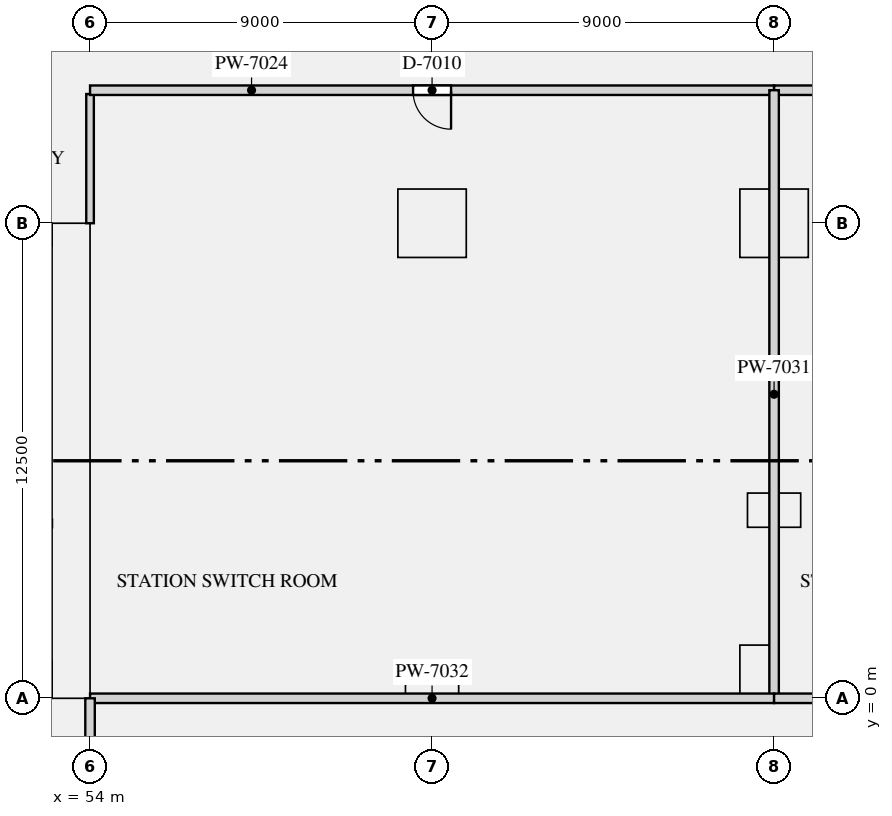
"""IFC4 building model, lengths in metres.
Left out: names, types, materials, properties, quantities, classifications, styles, units other than length and angle.
Written with IfcOpenShell. Run it as: python <this file> out.ifc"""

import sys

from ifc_helpers import new_model, si_unit, direction, frame, frame_2d, origin, origin_2d, place, context, subcontext, project, spatial, rectangle, extrude, element, fill, save


model = new_model("IFC4")
c1 = context("Model", 3, precision=1e-05, world=origin(), true_north=direction((0.0, 1.0)))
c2 = subcontext(c1, "Body", "Model", "MODEL_VIEW")
j1 = project(units=[si_unit("LENGTHUNIT", "METRE"), si_unit("PLANEANGLEUNIT", "RADIAN")], contexts=[c1])
p1 = place(None, origin())
s1 = spatial("IfcSite", under=j1, at=p1, CompositionType="ELEMENT")
p2 = place(p1, origin())
s2 = spatial("IfcBuilding", under=s1, at=p2, CompositionType="ELEMENT")
p3 = place(p2, frame((0.0, 0.0, -6.0)))
s3 = spatial("IfcBuildingStorey", under=s2, at=p3, CompositionType="ELEMENT", Elevation=-6.0)
for number, where, z_axis, x_axis in (
    (1, (63.0, 0.45, -0.5), (0.0, 0.0, 1.0), (1.0, 0.0, 0.0)),
    (2, (71.55, 0.7, -0.5), (0.0, 0.0, 1.0), (0.0, 1.0, 0.0)),
    (3, (72.0, 4.95, -0.5), (0.0, 0.0, 1.0), (1.0, 0.0, 0.0)),
):
    element("IfcColumn", number, at=place(p3, frame(where, z_axis=z_axis, x_axis=x_axis)), inside=s3, PredefinedType="USERDEFINED", context=c2, shape_type="SweptSolid", body=[
        extrude(rectangle(XDim=1.4, YDim=0.9, at=origin_2d()), origin(), (0.0, 0.0, 1.0), 6.5),
    ])
for number, where, z_axis, x_axis in (
    (4, (63.0, 12.5, -0.5), (0.0, 0.0, 1.0), (1.0, 0.0, 0.0)),
    (5, (72.0, 12.5, -0.5), (0.0, 0.0, 1.0), (1.0, 0.0, 0.0)),
):
    element("IfcColumn", number, at=place(p3, frame(where, z_axis=z_axis, x_axis=x_axis)), inside=s3, PredefinedType="COLUMN", context=c2, shape_type="SweptSolid", body=[
        extrude(rectangle(XDim=1.8, YDim=1.8, at=origin_2d()), origin(), (0.0, 0.0, 1.0), 6.5),
    ])
p4 = place(p3, frame((53.5, 0.0, -0.5), z_axis=(0.0, 0.0, 1.0), x_axis=(0.0, 1.0, 0.0)))
e6 = element("IfcWall", 6, at=p4, inside=s3, PredefinedType="SHEAR", context=c2, shape_type="SweptSolid", body=[
    extrude(rectangle(XDim=12.5, YDim=1.0, at=frame_2d((6.25, 0.0))), origin(), (0.0, 0.0, 1.0), 6.5),
])
p5 = place(p3, frame((54.0, 12.5, 0.0), z_axis=(0.0, 0.0, 1.0), x_axis=(0.0, 1.0, 0.0)))
e7 = element("IfcWall", 7, at=p5, inside=s3, PredefinedType="PARTITIONING", context=c2, shape_type="SweptSolid", body=[
    extrude(rectangle(XDim=3.4, YDim=0.2, at=frame_2d((1.7, 0.0))), origin(), (0.0, 0.0, 1.0), 5.598),
])
p6 = place(p3, frame((54.0, 16.0, 0.0), z_axis=(0.0, 0.0, 1.0), x_axis=(1.0, 0.0, 0.0)))
e8 = element("IfcWall", 8, at=p6, inside=s3, PredefinedType="PARTITIONING", context=c2, shape_type="SweptSolid", body=[
    extrude(rectangle(XDim=18.0, YDim=0.25, at=frame_2d((9.0, 0.0))), origin(), (0.0, 0.0, 1.0), 5.598),
])
p7 = place(p6, frame((8.5, 0.0, 0.0)))
e9 = element("IfcOpeningElement", 9, at=p7, cuts=e8, PredefinedType="OPENING", context=c2, shape_type="SweptSolid", body=[
    extrude(rectangle(XDim=1.0, YDim=2.1, at=frame_2d((0.5, 1.05))), frame((0.0, 0.135, 0.0), z_axis=(0.0, -1.0, 0.0), x_axis=(1.0, 0.0, 0.0)), (0.0, 0.0, 1.0), 0.27),
])
p8 = place(p3, frame((72.0, 16.0, 0.0), z_axis=(0.0, 0.0, 1.0), x_axis=(1.0, 0.0, 0.0)))
e10 = element("IfcWall", 10, at=p8, inside=s3, PredefinedType="PARTITIONING", context=c2, shape_type="SweptSolid", body=[
    extrude(rectangle(XDim=18.0, YDim=0.25, at=frame_2d((9.0, 0.0))), origin(), (0.0, 0.0, 1.0), 5.598),
])
p9 = place(p8, frame((8.5, 0.0, 0.0)))
e11 = element("IfcOpeningElement", 11, at=p9, cuts=e10, PredefinedType="OPENING", context=c2, shape_type="SweptSolid", body=[
    extrude(rectangle(XDim=1.0, YDim=2.1, at=frame_2d((0.5, 1.05))), frame((0.0, 0.135, 0.0), z_axis=(0.0, -1.0, 0.0), x_axis=(1.0, 0.0, 0.0)), (0.0, 0.0, 1.0), 0.27),
])
p10 = place(p3, frame((72.0, 0.0, 0.0), z_axis=(0.0, 0.0, 1.0), x_axis=(0.0, 1.0, 0.0)))
e12 = element("IfcWall", 12, at=p10, inside=s3, PredefinedType="PARTITIONING", context=c2, shape_type="SweptSolid", body=[
    extrude(rectangle(XDim=16.0, YDim=0.25, at=frame_2d((8.0, 0.0))), origin(), (0.0, 0.0, 1.0), 5.598),
])
p11 = place(p3, frame((54.0, 0.0, 0.0), z_axis=(0.0, 0.0, 1.0), x_axis=(1.0, 0.0, 0.0)))
e13 = element("IfcWall", 13, at=p11, inside=s3, PredefinedType="PARTITIONING", context=c2, shape_type="SweptSolid", body=[
    extrude(rectangle(XDim=18.0, YDim=0.25, at=frame_2d((9.0, 0.0))), origin(), (0.0, 0.0, 1.0), 5.598),
])
p12 = place(p3, frame((72.0, 0.0, 0.0), z_axis=(0.0, 0.0, 1.0), x_axis=(1.0, 0.0, 0.0)))
e14 = element("IfcWall", 14, at=p12, inside=s3, PredefinedType="PARTITIONING", context=c2, shape_type="SweptSolid", body=[
    extrude(rectangle(XDim=18.0, YDim=0.25, at=frame_2d((9.0, 0.0))), origin(), (0.0, 0.0, 1.0), 5.598),
])
p13 = place(p12, frame((6.3, 0.0, 0.0)))
e15 = element("IfcOpeningElement", 15, at=p13, cuts=e14, PredefinedType="OPENING", context=c2, shape_type="SweptSolid", body=[
    extrude(rectangle(XDim=1.8, YDim=2.4, at=frame_2d((0.9, 1.2))), frame((0.0, 0.135, 0.0), z_axis=(0.0, -1.0, 0.0), x_axis=(1.0, 0.0, 0.0)), (0.0, 0.0, 1.0), 0.27),
])
p14 = place(p3, frame((54.0, -9.0, 0.0), z_axis=(0.0, 0.0, 1.0), x_axis=(0.0, 1.0, 0.0)))
e16 = element("IfcWall", 16, at=p14, inside=s3, PredefinedType="PARTITIONING", context=c2, shape_type="SweptSolid", body=[
    extrude(rectangle(XDim=9.0, YDim=0.25, at=frame_2d((4.5, 0.0))), origin(), (0.0, 0.0, 1.0), 5.598),
])
p15 = place(p7, frame((1.0, 0.0, 0.0), z_axis=(0.0, 0.0, 1.0), x_axis=(-1.0, 0.0, 0.0)))
e17 = element("IfcDoor", 17, at=p15, inside=s3, OperationType="SINGLE_SWING_LEFT", PredefinedType="DOOR", context=c2, shape_type="SweptSolid", body=[
    extrude(rectangle(XDim=1.0, YDim=2.1, at=frame_2d((0.5, 1.05))), frame((0.0, 0.025, 0.0), z_axis=(0.0, -1.0, 0.0), x_axis=(1.0, 0.0, 0.0)), (0.0, 0.0, 1.0), 0.05),
])
fill(e9, e17)
save(model, sys.argv[1])
